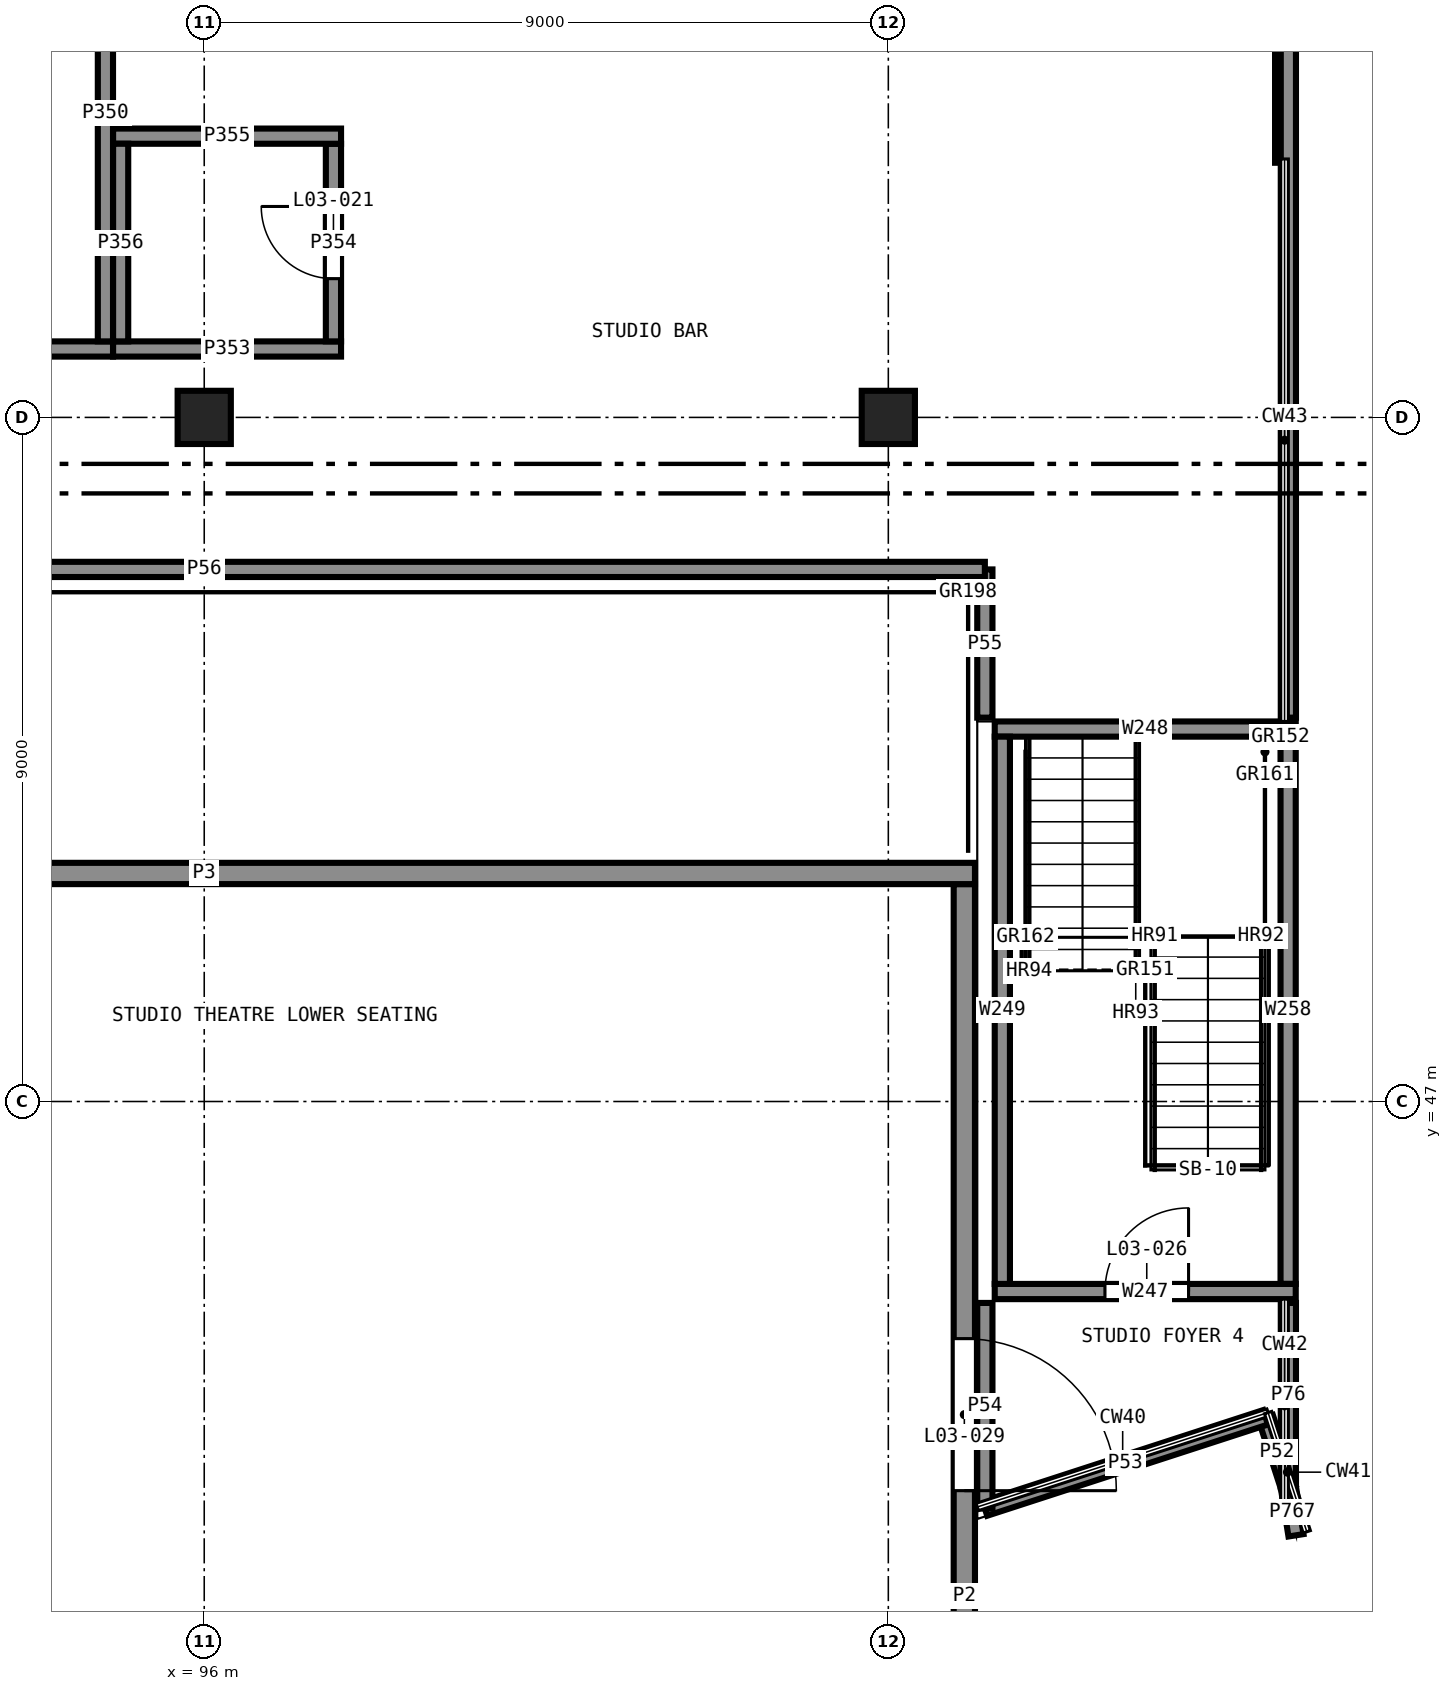
"""IFC4 building model, lengths in metres.
Left out: names, types, materials, properties, quantities, classifications, styles, units other than length and angle.
Written with IfcOpenShell. Run it as: python <this file> out.ifc"""

import sys

from ifc_helpers import new_model, si_unit, direction, frame, frame_2d, origin, origin_2d, place, context, subcontext, project, spatial, rectangle, extrude, element, fill, save


model = new_model("IFC4")
c1 = context("Model", 3, precision=1e-05, world=origin(), true_north=direction((0.0, 1.0)))
c2 = subcontext(c1, "Body", "Model", "MODEL_VIEW")
j1 = project(units=[si_unit("LENGTHUNIT", "METRE"), si_unit("PLANEANGLEUNIT", "RADIAN")], contexts=[c1])
p1 = place(None, origin())
s1 = spatial("IfcSite", under=j1, at=p1, CompositionType="ELEMENT")
p2 = place(p1, origin())
s2 = spatial("IfcBuilding", under=s1, at=p2, CompositionType="ELEMENT")
p3 = place(p2, frame((0.0, 0.0, 13.5)))
s3 = spatial("IfcBuildingStorey", under=s2, at=p3, CompositionType="ELEMENT", Elevation=13.5)
p4 = place(p3, frame((106.4, 44.5, 0.0), z_axis=(0.0, 0.0, 1.0), x_axis=(1.0, 0.0, 0.0)))
e1 = element("IfcWall", 1, at=p4, inside=s3, PredefinedType="SHEAR", context=c2, shape_type="SweptSolid", body=[
    extrude(rectangle(XDim=3.96, YDim=0.2, at=frame_2d((1.98, 0.0))), origin(), (0.0, 0.0, 1.0), 3.7),
])
p5 = place(p4, frame((1.45, 0.0, 0.0)))
e2 = element("IfcOpeningElement", 2, at=p5, cuts=e1, PredefinedType="OPENING", context=c2, shape_type="SweptSolid", body=[
    extrude(rectangle(XDim=1.1, YDim=2.1, at=frame_2d((0.55, 1.05))), frame((0.0, 0.11, 0.0), z_axis=(0.0, -1.0, 0.0), x_axis=(1.0, 0.0, 0.0)), (0.0, 0.0, 1.0), 0.22),
])
p6 = place(p3, frame((110.36, 51.9, 0.0), z_axis=(0.0, 0.0, 1.0), x_axis=(-1.0, 0.0, 0.0)))
e3 = element("IfcWall", 3, at=p6, inside=s3, PredefinedType="SHEAR", context=c2, shape_type="SweptSolid", body=[
    extrude(rectangle(XDim=3.96, YDim=0.2, at=frame_2d((1.98, 0.0))), origin(), (0.0, 0.0, 1.0), 3.7),
])
for number, where, z_axis, x_axis in (
    (4, (106.5, 51.8, 0.0), (0.0, 0.0, 1.0), (0.0, -1.0, 0.0)),
    (5, (110.26, 44.6, 0.0), (0.0, 0.0, 1.0), (0.0, 1.0, 0.0)),
):
    element("IfcWall", number, at=place(p3, frame(where, z_axis=z_axis, x_axis=x_axis)), inside=s3, PredefinedType="SHEAR", context=c2, shape_type="SweptSolid", body=[
        extrude(rectangle(XDim=7.2, YDim=0.2, at=frame_2d((3.6, 0.0))), origin(), (0.0, 0.0, 1.0), 3.7),
    ])
for number, where, z_axis, x_axis in (
    (6, (96.0, 56.0, 0.0), (0.0, 0.0, 1.0), (1.0, 0.0, 0.0)),
    (7, (105.0, 56.0, 0.0), (0.0, 0.0, 1.0), (1.0, 0.0, 0.0)),
):
    element("IfcColumn", number, at=place(p3, frame(where, z_axis=z_axis, x_axis=x_axis)), inside=s3, PredefinedType="COLUMN", context=c2, shape_type="SweptSolid", body=[
        extrude(rectangle(XDim=0.7, YDim=0.7, at=origin_2d()), origin(), (0.0, 0.0, 1.0), 3.7),
    ])
p7 = place(p3, frame((106.0, 31.14, 0.0), z_axis=(0.0, 0.0, 1.0), x_axis=(0.0, 1.0, 0.0)))
e8 = element("IfcWall", 8, at=p7, inside=s3, PredefinedType="SOLIDWALL", context=c2, shape_type="SweptSolid", body=[
    extrude(rectangle(XDim=18.72, YDim=0.28, at=frame_2d((9.36, 0.0))), origin(), (0.0, 0.0, 1.0), 4.0),
])
p8 = place(p7, frame((10.74, 0.0, 0.0)))
e9 = element("IfcOpeningElement", 9, at=p8, cuts=e8, PredefinedType="OPENING", context=c2, shape_type="SweptSolid", body=[
    extrude(rectangle(XDim=2.0, YDim=2.1, at=frame_2d((1.0, 1.05))), frame((0.0, 0.15, 0.0), z_axis=(0.0, -1.0, 0.0), x_axis=(1.0, 0.0, 0.0)), (0.0, 0.0, 1.0), 0.3),
])
p9 = place(p3, frame((106.14, 50.0, 0.0), z_axis=(0.0, 0.0, 1.0), x_axis=(-1.0, 0.0, 0.0)))
e10 = element("IfcWall", 10, at=p9, inside=s3, PredefinedType="SOLIDWALL", context=c2, shape_type="SweptSolid", body=[
    extrude(rectangle(XDim=20.28, YDim=0.28, at=frame_2d((10.14, 0.0))), origin(), (0.0, 0.0, 1.0), 4.0),
])
p10 = place(p3, frame((110.213, 59.35, 0.0), z_axis=(0.0, 0.0, 1.0), x_axis=(0.0, 1.0, 0.0)))
e11 = element("IfcWall", 11, at=p10, inside=s3, PredefinedType="SOLIDWALL", context=c2, shape_type="SweptSolid", body=[
    extrude(rectangle(XDim=20.587, YDim=0.25, at=frame_2d((10.293, 0.0))), origin(), (0.0, 0.0, 1.0), 3.7),
])
p11 = place(p3, frame((110.263, 41.924, 4.0), z_axis=(0.0, 0.0, 1.0), x_axis=(-0.309034774937, 0.951050738857, 0.0)))
e12 = element("IfcWall", 12, at=p11, inside=s3, PredefinedType="PARAPET", context=c2, shape_type="SweptSolid", body=[
    extrude(rectangle(XDim=0.969, YDim=0.2, at=frame_2d((0.484, 0.0))), origin(), (0.0, 0.0, 1.0), 1.1),
])
p12 = place(p3, frame((109.964, 42.845, 4.0), z_axis=(0.0, 0.0, 1.0), x_axis=(-0.95105716295, -0.309015004168, 0.0)))
e13 = element("IfcWall", 13, at=p12, inside=s3, PredefinedType="PARAPET", context=c2, shape_type="SweptSolid", body=[
    extrude(rectangle(XDim=3.884, YDim=0.2, at=frame_2d((1.942, 0.0))), origin(), (0.0, 0.0, 1.0), 1.1),
])
p13 = place(p3, frame((106.27, 41.645, 4.0), z_axis=(0.0, 0.0, 1.0), x_axis=(0.0, 1.0, 0.0)))
e14 = element("IfcWall", 14, at=p13, inside=s3, PredefinedType="PARAPET", context=c2, shape_type="SweptSolid", body=[
    extrude(rectangle(XDim=2.705, YDim=0.2, at=frame_2d((1.353, 0.0))), origin(), (0.0, 0.0, 1.0), 1.1),
])
p14 = place(p3, frame((106.27, 52.05, 4.0), z_axis=(0.0, 0.0, 1.0), x_axis=(0.0, 1.0, 0.0)))
e15 = element("IfcWall", 15, at=p14, inside=s3, PredefinedType="PARAPET", context=c2, shape_type="SweptSolid", body=[
    extrude(rectangle(XDim=1.95, YDim=0.2, at=frame_2d((0.975, 0.0))), origin(), (0.0, 0.0, 1.0), 1.1),
])
p15 = place(p3, frame((106.27, 54.0, 4.0), z_axis=(0.0, 0.0, 1.0), x_axis=(-1.0, 0.0, 0.0)))
e16 = element("IfcWall", 16, at=p15, inside=s3, PredefinedType="PARAPET", context=c2, shape_type="SweptSolid", body=[
    extrude(rectangle(XDim=20.54, YDim=0.2, at=frame_2d((10.27, 0.0))), origin(), (0.0, 0.0, 1.0), 1.1),
])
p16 = place(p3, frame((110.263, 79.887, 4.0), z_axis=(0.0, 0.0, 1.0), x_axis=(8.770391e-06, -0.999999999962, 0.0)))
e17 = element("IfcWall", 17, at=p16, inside=s3, PredefinedType="PARAPET", context=c2, shape_type="SweptSolid", body=[
    extrude(rectangle(XDim=27.837, YDim=0.2, at=frame_2d((13.918, 0.0))), origin(), (0.0, 0.0, 1.0), 1.1),
])
p17 = place(p3, frame((110.263, 44.35, 4.0), z_axis=(0.0, 0.0, 1.0), x_axis=(0.0, -1.0, 0.0)))
e18 = element("IfcWall", 18, at=p17, inside=s3, PredefinedType="PARAPET", context=c2, shape_type="SweptSolid", body=[
    extrude(rectangle(XDim=2.426, YDim=0.2, at=frame_2d((1.213, 0.0))), origin(), (0.0, 0.0, 1.0), 1.1),
])
p18 = place(p3, frame((91.1, 56.9, 0.0), z_axis=(0.0, 0.0, 1.0), x_axis=(1.0, 0.0, 0.0)))
e19 = element("IfcWall", 19, at=p18, inside=s3, PredefinedType="PARTITIONING", context=c2, shape_type="SweptSolid", body=[
    extrude(rectangle(XDim=3.7, YDim=0.2, at=frame_2d((1.85, 0.0))), origin(), (0.0, 0.0, 1.0), 3.7),
])
p19 = place(p18, frame((1.4, 0.0, 0.0)))
e20 = element("IfcOpeningElement", 20, at=p19, cuts=e19, PredefinedType="OPENING", context=c2, shape_type="SweptSolid", body=[
    extrude(rectangle(XDim=0.9, YDim=2.1, at=frame_2d((0.45, 1.05))), frame((0.0, 0.11, 0.0), z_axis=(0.0, -1.0, 0.0), x_axis=(1.0, 0.0, 0.0)), (0.0, 0.0, 1.0), 0.22),
])
p20 = place(p3, frame((94.7, 57.0, 0.0), z_axis=(0.0, 0.0, 1.0), x_axis=(0.0, 1.0, 0.0)))
e21 = element("IfcWall", 21, at=p20, inside=s3, PredefinedType="PARTITIONING", context=c2, shape_type="SweptSolid", body=[
    extrude(rectangle(XDim=6.0, YDim=0.2, at=frame_2d((3.0, 0.0))), origin(), (0.0, 0.0, 1.0), 3.7),
])
p21 = place(p3, frame((94.8, 56.9, 0.0), z_axis=(0.0, 0.0, 1.0), x_axis=(1.0, 0.0, 0.0)))
e22 = element("IfcWall", 22, at=p21, inside=s3, PredefinedType="PARTITIONING", context=c2, shape_type="SweptSolid", body=[
    extrude(rectangle(XDim=3.0, YDim=0.2, at=frame_2d((1.5, 0.0))), origin(), (0.0, 0.0, 1.0), 3.7),
])
p22 = place(p3, frame((97.7, 57.0, 0.0), z_axis=(0.0, 0.0, 1.0), x_axis=(0.0, 1.0, 0.0)))
e23 = element("IfcWall", 23, at=p22, inside=s3, PredefinedType="PARTITIONING", context=c2, shape_type="SweptSolid", body=[
    extrude(rectangle(XDim=2.6, YDim=0.2, at=frame_2d((1.3, 0.0))), origin(), (0.0, 0.0, 1.0), 3.7),
])
p23 = place(p22, frame((0.825, 0.0, 0.0)))
e24 = element("IfcOpeningElement", 24, at=p23, cuts=e23, PredefinedType="OPENING", context=c2, shape_type="SweptSolid", body=[
    extrude(rectangle(XDim=0.95, YDim=2.1, at=frame_2d((0.475, 1.05))), frame((0.0, 0.11, 0.0), z_axis=(0.0, -1.0, 0.0), x_axis=(1.0, 0.0, 0.0)), (0.0, 0.0, 1.0), 0.22),
])
p24 = place(p3, frame((97.8, 59.7, 0.0), z_axis=(0.0, 0.0, 1.0), x_axis=(-1.0, 0.0, 0.0)))
e25 = element("IfcWall", 25, at=p24, inside=s3, PredefinedType="PARTITIONING", context=c2, shape_type="SweptSolid", body=[
    extrude(rectangle(XDim=3.0, YDim=0.2, at=frame_2d((1.5, 0.0))), origin(), (0.0, 0.0, 1.0), 3.7),
])
p25 = place(p3, frame((94.9, 59.6, 0.0), z_axis=(0.0, 0.0, 1.0), x_axis=(0.0, -1.0, 0.0)))
e26 = element("IfcWall", 26, at=p25, inside=s3, PredefinedType="PARTITIONING", context=c2, shape_type="SweptSolid", body=[
    extrude(rectangle(XDim=2.6, YDim=0.2, at=frame_2d((1.3, 0.0))), origin(), (0.0, 0.0, 1.0), 3.7),
])
p26 = place(p3, frame((110.266, 41.905, 4.0), z_axis=(0.0, 0.0, 1.0), x_axis=(0.156529459574, -0.987673290256, 0.0)))
e27 = element("IfcWall", 27, at=p26, inside=s3, PredefinedType="PARAPET", context=c2, shape_type="SweptSolid", body=[
    extrude(rectangle(XDim=0.619, YDim=0.2, at=frame_2d((0.31, 0.0))), origin(), (0.0, 0.0, 1.0), 1.1),
])
p27 = place(p23, origin())
e28 = element("IfcDoor", 28, at=p27, inside=s3, OperationType="SINGLE_SWING_LEFT", PredefinedType="DOOR", context=c2, shape_type="SweptSolid", body=[
    extrude(rectangle(XDim=0.95, YDim=2.1, at=frame_2d((0.475, 1.05))), frame((0.0, 0.025, 0.0), z_axis=(0.0, -1.0, 0.0), x_axis=(1.0, 0.0, 0.0)), (0.0, 0.0, 1.0), 0.05),
])
fill(e24, e28)
p28 = place(p5, origin())
e29 = element("IfcDoor", 29, at=p28, inside=s3, OperationType="SINGLE_SWING_LEFT", PredefinedType="DOOR", context=c2, shape_type="SweptSolid", body=[
    extrude(rectangle(XDim=1.1, YDim=2.1, at=frame_2d((0.55, 1.05))), frame((0.0, 0.025, 0.0), z_axis=(0.0, -1.0, 0.0), x_axis=(1.0, 0.0, 0.0)), (0.0, 0.0, 1.0), 0.05),
])
fill(e2, e29)
p29 = place(p8, frame((2.0, 0.0, 0.0), z_axis=(0.0, 0.0, 1.0), x_axis=(-1.0, 0.0, 0.0)))
e30 = element("IfcDoor", 30, at=p29, inside=s3, OperationType="DOUBLE_DOOR_SINGLE_SWING", PredefinedType="DOOR", context=c2, shape_type="SweptSolid", body=[
    extrude(rectangle(XDim=2.0, YDim=2.1, at=frame_2d((1.0, 1.05))), frame((0.0, 0.025, 0.0), z_axis=(0.0, -1.0, 0.0), x_axis=(1.0, 0.0, 0.0)), (0.0, 0.0, 1.0), 0.05),
])
fill(e9, e30)
save(model, sys.argv[1])
